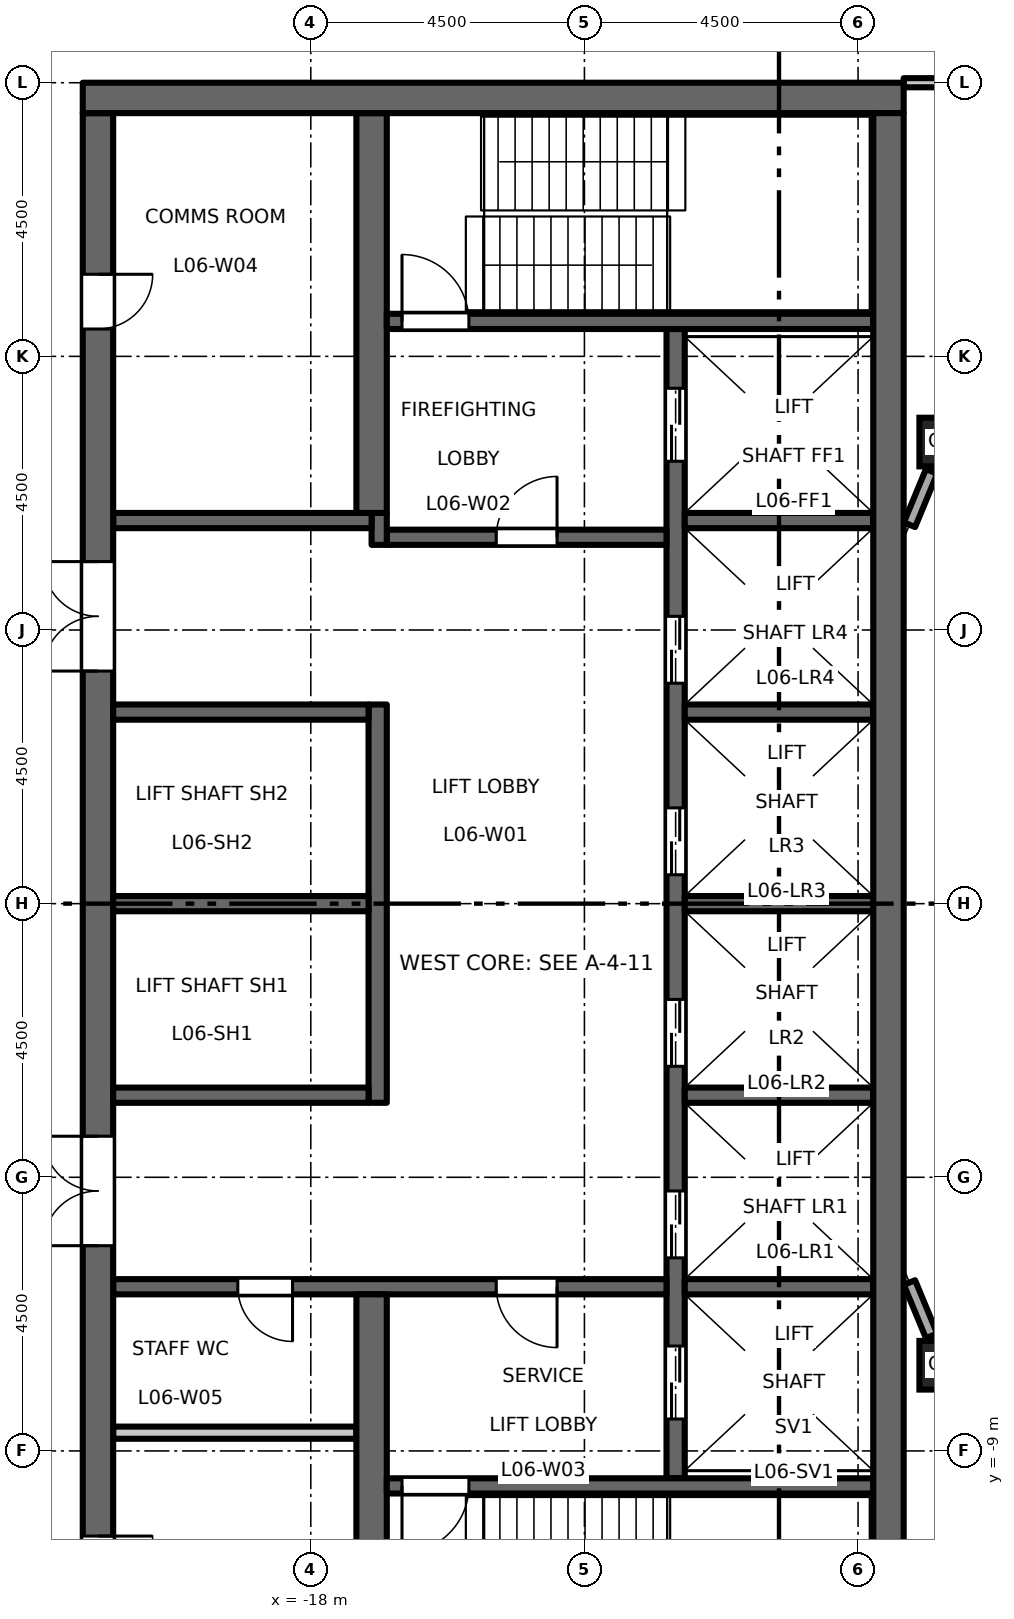
"""IFC4 building model, lengths in metres.
Left out: names, types, materials, properties, quantities, classifications, styles, units other than length and angle.
Written with IfcOpenShell. Run it as: python <this file> out.ifc"""

import sys

from ifc_helpers import new_model, si_unit, direction, frame, frame_2d, origin, origin_2d, place, context, subcontext, project, spatial, rectangle, hollow_rectangle, extrude, element, fill, save


model = new_model("IFC4")
c1 = context("Model", 3, precision=1e-05, world=origin(), true_north=direction((0.0, 1.0)))
c2 = subcontext(c1, "Body", "Model", "MODEL_VIEW")
j1 = project(units=[si_unit("LENGTHUNIT", "METRE"), si_unit("PLANEANGLEUNIT", "RADIAN")], contexts=[c1])
p1 = place(None, origin())
s1 = spatial("IfcSite", under=j1, at=p1, CompositionType="ELEMENT")
p2 = place(p1, origin())
s2 = spatial("IfcBuilding", under=s1, at=p2, CompositionType="ELEMENT")
p3 = place(p2, frame((0.0, 0.0, 31.2)))
s3 = spatial("IfcBuildingStorey", under=s2, at=p3, CompositionType="ELEMENT", Elevation=31.2)
for number, where, z_axis, x_axis in (
    (1, (-7.591, -7.591, 0.0), (0.0, 0.0, 1.0), (1.0, 0.0, 0.0)),
    (2, (-7.591, 7.591, 0.0), (0.0, 0.0, 1.0), (1.0, 0.0, 0.0)),
):
    element("IfcColumn", number, at=place(p3, frame(where, z_axis=z_axis, x_axis=x_axis)), inside=s3, PredefinedType="COLUMN", context=c2, shape_type="SweptSolid", body=[
        extrude(hollow_rectangle(XDim=0.8, YDim=0.8, WallThickness=0.05, at=origin_2d()), origin(), (0.0, 0.0, 1.0), 4.5),
    ])
p4 = place(p3, frame((-12.0, -9.45, 0.0), z_axis=(0.0, 0.0, 1.0), x_axis=(0.0, 1.0, 0.0)))
e3 = element("IfcWall", 3, at=p4, inside=s3, PredefinedType="SHEAR", context=c2, shape_type="SweptSolid", body=[
    extrude(rectangle(XDim=18.9, YDim=0.3, at=frame_2d((9.45, 0.0))), origin(), (0.0, 0.0, 1.0), 4.35),
])
p5 = place(p4, frame((3.625, 0.0, 0.0)))
e4 = element("IfcOpeningElement", 4, at=p5, cuts=e3, PredefinedType="OPENING", context=c2, shape_type="SweptSolid", body=[
    extrude(rectangle(XDim=1.1, YDim=2.1, at=frame_2d((0.55, 1.05))), frame((0.0, 0.16, 0.0), z_axis=(0.0, -1.0, 0.0), x_axis=(1.0, 0.0, 0.0)), (0.0, 0.0, 1.0), 0.32),
])
p6 = place(p4, frame((6.775, 0.0, 0.0)))
e5 = element("IfcOpeningElement", 5, at=p6, cuts=e3, PredefinedType="OPENING", context=c2, shape_type="SweptSolid", body=[
    extrude(rectangle(XDim=1.1, YDim=2.1, at=frame_2d((0.55, 1.05))), frame((0.0, 0.16, 0.0), z_axis=(0.0, -1.0, 0.0), x_axis=(1.0, 0.0, 0.0)), (0.0, 0.0, 1.0), 0.32),
])
p7 = place(p4, frame((9.925, 0.0, 0.0)))
e6 = element("IfcOpeningElement", 6, at=p7, cuts=e3, PredefinedType="OPENING", context=c2, shape_type="SweptSolid", body=[
    extrude(rectangle(XDim=1.1, YDim=2.1, at=frame_2d((0.55, 1.05))), frame((0.0, 0.16, 0.0), z_axis=(0.0, -1.0, 0.0), x_axis=(1.0, 0.0, 0.0)), (0.0, 0.0, 1.0), 0.32),
])
p8 = place(p4, frame((13.075, 0.0, 0.0)))
e7 = element("IfcOpeningElement", 7, at=p8, cuts=e3, PredefinedType="OPENING", context=c2, shape_type="SweptSolid", body=[
    extrude(rectangle(XDim=1.1, YDim=2.1, at=frame_2d((0.55, 1.05))), frame((0.0, 0.16, 0.0), z_axis=(0.0, -1.0, 0.0), x_axis=(1.0, 0.0, 0.0)), (0.0, 0.0, 1.0), 0.32),
])
p9 = place(p4, frame((16.725, 0.0, 0.0)))
e8 = element("IfcOpeningElement", 8, at=p9, cuts=e3, PredefinedType="OPENING", context=c2, shape_type="SweptSolid", body=[
    extrude(rectangle(XDim=1.2, YDim=2.1, at=frame_2d((0.6, 1.05))), frame((0.0, 0.16, 0.0), z_axis=(0.0, -1.0, 0.0), x_axis=(1.0, 0.0, 0.0)), (0.0, 0.0, 1.0), 0.32),
])
p10 = place(p4, frame((0.975, 0.0, 0.0)))
e9 = element("IfcOpeningElement", 9, at=p10, cuts=e3, PredefinedType="OPENING", context=c2, shape_type="SweptSolid", body=[
    extrude(rectangle(XDim=1.2, YDim=2.1, at=frame_2d((0.6, 1.05))), frame((0.0, 0.16, 0.0), z_axis=(0.0, -1.0, 0.0), x_axis=(1.0, 0.0, 0.0)), (0.0, 0.0, 1.0), 0.32),
])
p11 = place(p3, frame((-12.15, 6.025, 0.0), z_axis=(0.0, 0.0, 1.0), x_axis=(-1.0, 0.0, 0.0)))
e10 = element("IfcWall", 10, at=p11, inside=s3, PredefinedType="SHEAR", context=c2, shape_type="SweptSolid", body=[
    extrude(rectangle(XDim=4.6, YDim=0.25, at=frame_2d((2.3, 0.0))), origin(), (0.0, 0.0, 1.0), 4.35),
])
p12 = place(p11, frame((1.8, 0.0, 0.0)))
e11 = element("IfcOpeningElement", 11, at=p12, cuts=e10, PredefinedType="OPENING", context=c2, shape_type="SweptSolid", body=[
    extrude(rectangle(XDim=1.0, YDim=2.1, at=frame_2d((0.5, 1.05))), frame((0.0, 0.135, 0.0), z_axis=(0.0, -1.0, 0.0), x_axis=(1.0, 0.0, 0.0)), (0.0, 0.0, 1.0), 0.27),
])
p13 = place(p3, frame((-16.875, 5.9, 0.0), z_axis=(0.0, 0.0, 1.0), x_axis=(0.0, 1.0, 0.0)))
e12 = element("IfcWall", 12, at=p13, inside=s3, PredefinedType="SHEAR", context=c2, shape_type="SweptSolid", body=[
    extrude(rectangle(XDim=0.525, YDim=0.25, at=frame_2d((0.263, 0.0))), origin(), (0.0, 0.0, 1.0), 4.35),
])
p14 = place(p3, frame((-17.0, 6.3, 0.0), z_axis=(0.0, 0.0, 1.0), x_axis=(-1.0, 0.0, 0.0)))
e13 = element("IfcWall", 13, at=p14, inside=s3, PredefinedType="SHEAR", context=c2, shape_type="SweptSolid", body=[
    extrude(rectangle(XDim=4.25, YDim=0.25, at=frame_2d((2.125, 0.0))), origin(), (0.0, 0.0, 1.0), 4.35),
])
p15 = place(p3, frame((-12.15, -6.3, 0.0), z_axis=(0.0, 0.0, 1.0), x_axis=(-1.0, 0.0, 0.0)))
e14 = element("IfcWall", 14, at=p15, inside=s3, PredefinedType="SHEAR", context=c2, shape_type="SweptSolid", body=[
    extrude(rectangle(XDim=9.1, YDim=0.25, at=frame_2d((4.55, 0.0))), origin(), (0.0, 0.0, 1.0), 4.35),
])
p16 = place(p15, frame((1.8, 0.0, 0.0)))
e15 = element("IfcOpeningElement", 15, at=p16, cuts=e14, PredefinedType="OPENING", context=c2, shape_type="SweptSolid", body=[
    extrude(rectangle(XDim=1.0, YDim=2.1, at=frame_2d((0.5, 1.05))), frame((0.0, 0.135, 0.0), z_axis=(0.0, -1.0, 0.0), x_axis=(1.0, 0.0, 0.0)), (0.0, 0.0, 1.0), 0.27),
])
p17 = place(p15, frame((6.15, 0.0, 0.0)))
e16 = element("IfcOpeningElement", 16, at=p17, cuts=e14, PredefinedType="OPENING", context=c2, shape_type="SweptSolid", body=[
    extrude(rectangle(XDim=0.9, YDim=2.1, at=frame_2d((0.45, 1.05))), frame((0.0, 0.135, 0.0), z_axis=(0.0, -1.0, 0.0), x_axis=(1.0, 0.0, 0.0)), (0.0, 0.0, 1.0), 0.27),
])
p18 = place(p3, frame((-21.5, -13.0, 0.0), z_axis=(0.0, 0.0, 1.0), x_axis=(0.0, 1.0, 0.0)))
e17 = element("IfcWall", 17, at=p18, inside=s3, PredefinedType="SHEAR", context=c2, shape_type="SweptSolid", body=[
    extrude(rectangle(XDim=26.0, YDim=0.5, at=frame_2d((13.0, 0.0))), origin(), (0.0, 0.0, 1.0), 4.35),
])
p19 = place(p18, frame((16.825, 0.0, 0.0)))
e18 = element("IfcOpeningElement", 18, at=p19, cuts=e17, PredefinedType="OPENING", context=c2, shape_type="SweptSolid", body=[
    extrude(rectangle(XDim=1.8, YDim=2.1, at=frame_2d((0.9, 1.05))), frame((0.0, 0.26, 0.0), z_axis=(0.0, -1.0, 0.0), x_axis=(1.0, 0.0, 0.0)), (0.0, 0.0, 1.0), 0.52),
])
p20 = place(p18, frame((7.375, 0.0, 0.0)))
e19 = element("IfcOpeningElement", 19, at=p20, cuts=e17, PredefinedType="OPENING", context=c2, shape_type="SweptSolid", body=[
    extrude(rectangle(XDim=1.8, YDim=2.1, at=frame_2d((0.9, 1.05))), frame((0.0, 0.26, 0.0), z_axis=(0.0, -1.0, 0.0), x_axis=(1.0, 0.0, 0.0)), (0.0, 0.0, 1.0), 0.52),
])
p21 = place(p18, frame((22.45, 0.0, 0.0)))
e20 = element("IfcOpeningElement", 20, at=p21, cuts=e17, PredefinedType="OPENING", context=c2, shape_type="SweptSolid", body=[
    extrude(rectangle(XDim=0.9, YDim=2.1, at=frame_2d((0.45, 1.05))), frame((0.0, 0.26, 0.0), z_axis=(0.0, -1.0, 0.0), x_axis=(1.0, 0.0, 0.0)), (0.0, 0.0, 1.0), 0.52),
])
p22 = place(p18, frame((1.7, 0.0, 0.0)))
e21 = element("IfcOpeningElement", 21, at=p22, cuts=e17, PredefinedType="OPENING", context=c2, shape_type="SweptSolid", body=[
    extrude(rectangle(XDim=0.9, YDim=2.1, at=frame_2d((0.45, 1.05))), frame((0.0, 0.26, 0.0), z_axis=(0.0, -1.0, 0.0), x_axis=(1.0, 0.0, 0.0)), (0.0, 0.0, 1.0), 0.52),
])
p23 = place(p3, frame((-17.25, -8.7, 0.0), z_axis=(0.0, 0.0, 1.0), x_axis=(-1.0, 0.0, 0.0)))
e22 = element("IfcWall", 22, at=p23, inside=s3, PredefinedType="PARTITIONING", context=c2, shape_type="SweptSolid", body=[
    extrude(rectangle(XDim=4.0, YDim=0.2, at=frame_2d((2.0, 0.0))), origin(), (0.0, 0.0, 1.0), 4.35),
])
p24 = place(p3, frame((-16.9, -3.275, 0.0), z_axis=(0.0, 0.0, 1.0), x_axis=(0.0, 1.0, 0.0)))
e23 = element("IfcWall", 23, at=p24, inside=s3, PredefinedType="SHEAR", context=c2, shape_type="SweptSolid", body=[
    extrude(rectangle(XDim=6.55, YDim=0.3, at=frame_2d((3.275, 0.0))), origin(), (0.0, 0.0, 1.0), 4.35),
])
for number, where, z_axis, x_axis in (
    (24, (-17.05, 0.0, 0.0), (0.0, 0.0, 1.0), (-1.0, 0.0, 0.0)),
    (25, (-17.05, 3.15, 0.0), (0.0, 0.0, 1.0), (-1.0, 0.0, 0.0)),
    (26, (-17.05, -3.15, 0.0), (0.0, 0.0, 1.0), (-1.0, 0.0, 0.0)),
):
    element("IfcWall", number, at=place(p3, frame(where, z_axis=z_axis, x_axis=x_axis)), inside=s3, PredefinedType="SHEAR", context=c2, shape_type="SweptSolid", body=[
        extrude(rectangle(XDim=4.2, YDim=0.25, at=frame_2d((2.1, 0.0))), origin(), (0.0, 0.0, 1.0), 4.35),
    ])
for number, where, z_axis, x_axis in (
    (27, (-17.0, 6.425, 0.0), (0.0, 0.0, 1.0), (0.0, 1.0, 0.0)),
    (28, (-17.0, -13.0, 0.0), (0.0, 0.0, 1.0), (0.0, 1.0, 0.0)),
):
    element("IfcWall", number, at=place(p3, frame(where, z_axis=z_axis, x_axis=x_axis)), inside=s3, PredefinedType="SHEAR", context=c2, shape_type="SweptSolid", body=[
        extrude(rectangle(XDim=6.575, YDim=0.5, at=frame_2d((3.288, 0.0))), origin(), (0.0, 0.0, 1.0), 4.35),
    ])
for number, where, z_axis, x_axis in (
    (29, (-8.75, 0.0, 0.0), (0.0, 0.0, 1.0), (-1.0, 0.0, 0.0)),
    (30, (-8.75, 3.15, 0.0), (0.0, 0.0, 1.0), (-1.0, 0.0, 0.0)),
    (31, (-8.75, 6.3, 0.0), (0.0, 0.0, 1.0), (-1.0, 0.0, 0.0)),
    (32, (-8.75, -3.15, 0.0), (0.0, 0.0, 1.0), (-1.0, 0.0, 0.0)),
    (33, (-8.75, -6.3, 0.0), (0.0, 0.0, 1.0), (-1.0, 0.0, 0.0)),
):
    element("IfcWall", number, at=place(p3, frame(where, z_axis=z_axis, x_axis=x_axis)), inside=s3, PredefinedType="SHEAR", context=c2, shape_type="SweptSolid", body=[
        extrude(rectangle(XDim=3.1, YDim=0.25, at=frame_2d((1.55, 0.0))), origin(), (0.0, 0.0, 1.0), 4.35),
    ])
p25 = place(p3, frame((-8.75, 9.575, 0.0), z_axis=(0.0, 0.0, 1.0), x_axis=(-1.0, 0.0, 0.0)))
e34 = element("IfcWall", 34, at=p25, inside=s3, PredefinedType="SHEAR", context=c2, shape_type="SweptSolid", body=[
    extrude(rectangle(XDim=8.0, YDim=0.25, at=frame_2d((4.0, 0.0))), origin(), (0.0, 0.0, 1.0), 4.35),
])
p26 = place(p25, frame((6.65, 0.0, 0.0)))
e35 = element("IfcOpeningElement", 35, at=p26, cuts=e34, PredefinedType="OPENING", context=c2, shape_type="SweptSolid", body=[
    extrude(rectangle(XDim=1.1, YDim=2.1, at=frame_2d((0.55, 1.05))), frame((0.0, 0.135, 0.0), z_axis=(0.0, -1.0, 0.0), x_axis=(1.0, 0.0, 0.0)), (0.0, 0.0, 1.0), 0.27),
])
p27 = place(p3, frame((-8.75, -9.575, 0.0), z_axis=(0.0, 0.0, 1.0), x_axis=(-1.0, 0.0, 0.0)))
e36 = element("IfcWall", 36, at=p27, inside=s3, PredefinedType="SHEAR", context=c2, shape_type="SweptSolid", body=[
    extrude(rectangle(XDim=8.0, YDim=0.25, at=frame_2d((4.0, 0.0))), origin(), (0.0, 0.0, 1.0), 4.35),
])
p28 = place(p27, frame((6.65, 0.0, 0.0)))
e37 = element("IfcOpeningElement", 37, at=p28, cuts=e36, PredefinedType="OPENING", context=c2, shape_type="SweptSolid", body=[
    extrude(rectangle(XDim=1.1, YDim=2.1, at=frame_2d((0.55, 1.05))), frame((0.0, 0.135, 0.0), z_axis=(0.0, -1.0, 0.0), x_axis=(1.0, 0.0, 0.0)), (0.0, 0.0, 1.0), 0.27),
])
p29 = place(p3, frame((-8.25, 13.25, 0.0), z_axis=(0.0, 0.0, 1.0), x_axis=(-1.0, 0.0, 0.0)))
e38 = element("IfcWall", 38, at=p29, inside=s3, PredefinedType="SHEAR", context=c2, shape_type="SweptSolid", body=[
    extrude(rectangle(XDim=13.5, YDim=0.5, at=frame_2d((6.75, 0.0))), origin(), (0.0, 0.0, 1.0), 4.35),
])
p30 = place(p3, frame((-8.5, -13.0, 0.0), z_axis=(0.0, 0.0, 1.0), x_axis=(0.0, 1.0, 0.0)))
e39 = element("IfcWall", 39, at=p30, inside=s3, PredefinedType="SHEAR", context=c2, shape_type="SweptSolid", body=[
    extrude(rectangle(XDim=26.0, YDim=0.5, at=frame_2d((13.0, 0.0))), origin(), (0.0, 0.0, 1.0), 4.35),
])
for number, where, z_axis, x_axis in (
    (40, (-7.791, 7.108, 0.0), (0.0, 0.0, 1.0), (-0.383, -0.924, 0.0)),
    (41, (-8.154, -6.231, 0.0), (0.0, 0.0, 1.0), (0.383, -0.924, 0.0)),
):
    element("IfcWall", number, at=place(p3, frame(where, z_axis=z_axis, x_axis=x_axis)), inside=s3, PredefinedType="STANDARD", context=c2, shape_type="SweptSolid", body=[
        extrude(rectangle(XDim=0.949, YDim=0.2, at=frame_2d((0.475, 0.0))), origin(), (0.0, 0.0, 1.0), 3.73),
    ])
p31 = place(p3, frame((-8.25, 13.5, 0.0), z_axis=(0.0, 0.0, 1.0), x_axis=(1.0, 0.0, 0.0)))
e42 = element("IfcWall", 42, at=p31, inside=s3, PredefinedType="PARTITIONING", context=c2, shape_type="SweptSolid", body=[
    extrude(rectangle(XDim=16.5, YDim=0.15, at=frame_2d((8.25, 0.0))), origin(), (0.0, 0.0, 1.0), 3.85),
])
p32 = place(p31, frame((1.4, 0.0, 0.0)))
e43 = element("IfcOpeningElement", 43, at=p32, cuts=e42, PredefinedType="OPENING", context=c2, shape_type="SweptSolid", body=[
    extrude(rectangle(XDim=1.0, YDim=2.1, at=frame_2d((0.5, 1.05))), frame((0.0, 0.085, 0.0), z_axis=(0.0, -1.0, 0.0), x_axis=(1.0, 0.0, 0.0)), (0.0, 0.0, 1.0), 0.17),
])
p33 = place(p31, frame((9.65, 0.0, 0.0)))
e44 = element("IfcOpeningElement", 44, at=p33, cuts=e42, PredefinedType="OPENING", context=c2, shape_type="SweptSolid", body=[
    extrude(rectangle(XDim=1.0, YDim=2.1, at=frame_2d((0.5, 1.05))), frame((0.0, 0.085, 0.0), z_axis=(0.0, -1.0, 0.0), x_axis=(1.0, 0.0, 0.0)), (0.0, 0.0, 1.0), 0.17),
])
p34 = place(p12, origin())
e45 = element("IfcDoor", 45, at=p34, inside=s3, OperationType="SINGLE_SWING_LEFT", PredefinedType="DOOR", context=c2, shape_type="SweptSolid", body=[
    extrude(rectangle(XDim=1.0, YDim=2.1, at=frame_2d((0.5, 1.05))), frame((0.0, 0.025, 0.0), z_axis=(0.0, -1.0, 0.0), x_axis=(1.0, 0.0, 0.0)), (0.0, 0.0, 1.0), 0.05),
])
fill(e11, e45)
p35 = place(p16, origin())
e46 = element("IfcDoor", 46, at=p35, inside=s3, OperationType="SINGLE_SWING_RIGHT", PredefinedType="DOOR", context=c2, shape_type="SweptSolid", body=[
    extrude(rectangle(XDim=1.0, YDim=2.1, at=frame_2d((0.5, 1.05))), frame((0.0, 0.025, 0.0), z_axis=(0.0, -1.0, 0.0), x_axis=(1.0, 0.0, 0.0)), (0.0, 0.0, 1.0), 0.05),
])
fill(e15, e46)
p36 = place(p26, origin())
e47 = element("IfcDoor", 47, at=p36, inside=s3, OperationType="SINGLE_SWING_RIGHT", PredefinedType="DOOR", context=c2, shape_type="SweptSolid", body=[
    extrude(rectangle(XDim=1.1, YDim=2.1, at=frame_2d((0.55, 1.05))), frame((0.0, 0.025, 0.0), z_axis=(0.0, -1.0, 0.0), x_axis=(1.0, 0.0, 0.0)), (0.0, 0.0, 1.0), 0.05),
])
fill(e35, e47)
p37 = place(p28, origin())
e48 = element("IfcDoor", 48, at=p37, inside=s3, OperationType="SINGLE_SWING_LEFT", PredefinedType="DOOR", context=c2, shape_type="SweptSolid", body=[
    extrude(rectangle(XDim=1.1, YDim=2.1, at=frame_2d((0.55, 1.05))), frame((0.0, 0.025, 0.0), z_axis=(0.0, -1.0, 0.0), x_axis=(1.0, 0.0, 0.0)), (0.0, 0.0, 1.0), 0.05),
])
fill(e37, e48)
p38 = place(p19, origin())
e49 = element("IfcDoor", 49, at=p38, inside=s3, OperationType="DOUBLE_DOOR_DOUBLE_SWING", PredefinedType="DOOR", context=c2, shape_type="SweptSolid", body=[
    extrude(rectangle(XDim=1.8, YDim=2.1, at=frame_2d((0.9, 1.05))), frame((0.0, 0.025, 0.0), z_axis=(0.0, -1.0, 0.0), x_axis=(1.0, 0.0, 0.0)), (0.0, 0.0, 1.0), 0.05),
])
fill(e18, e49)
p39 = place(p20, origin())
e50 = element("IfcDoor", 50, at=p39, inside=s3, OperationType="DOUBLE_DOOR_DOUBLE_SWING", PredefinedType="DOOR", context=c2, shape_type="SweptSolid", body=[
    extrude(rectangle(XDim=1.8, YDim=2.1, at=frame_2d((0.9, 1.05))), frame((0.0, 0.025, 0.0), z_axis=(0.0, -1.0, 0.0), x_axis=(1.0, 0.0, 0.0)), (0.0, 0.0, 1.0), 0.05),
])
fill(e19, e50)
p40 = place(p5, origin())
e51 = element("IfcDoor", 51, at=p40, inside=s3, OperationType="DOUBLE_DOOR_SLIDING", PredefinedType="DOOR", context=c2, shape_type="SweptSolid", body=[
    extrude(rectangle(XDim=1.1, YDim=2.1, at=frame_2d((0.55, 1.05))), frame((0.0, 0.025, 0.0), z_axis=(0.0, -1.0, 0.0), x_axis=(1.0, 0.0, 0.0)), (0.0, 0.0, 1.0), 0.05),
])
fill(e4, e51)
p41 = place(p6, origin())
e52 = element("IfcDoor", 52, at=p41, inside=s3, OperationType="DOUBLE_DOOR_SLIDING", PredefinedType="DOOR", context=c2, shape_type="SweptSolid", body=[
    extrude(rectangle(XDim=1.1, YDim=2.1, at=frame_2d((0.55, 1.05))), frame((0.0, 0.025, 0.0), z_axis=(0.0, -1.0, 0.0), x_axis=(1.0, 0.0, 0.0)), (0.0, 0.0, 1.0), 0.05),
])
fill(e5, e52)
p42 = place(p7, origin())
e53 = element("IfcDoor", 53, at=p42, inside=s3, OperationType="DOUBLE_DOOR_SLIDING", PredefinedType="DOOR", context=c2, shape_type="SweptSolid", body=[
    extrude(rectangle(XDim=1.1, YDim=2.1, at=frame_2d((0.55, 1.05))), frame((0.0, 0.025, 0.0), z_axis=(0.0, -1.0, 0.0), x_axis=(1.0, 0.0, 0.0)), (0.0, 0.0, 1.0), 0.05),
])
fill(e6, e53)
p43 = place(p8, origin())
e54 = element("IfcDoor", 54, at=p43, inside=s3, OperationType="DOUBLE_DOOR_SLIDING", PredefinedType="DOOR", context=c2, shape_type="SweptSolid", body=[
    extrude(rectangle(XDim=1.1, YDim=2.1, at=frame_2d((0.55, 1.05))), frame((0.0, 0.025, 0.0), z_axis=(0.0, -1.0, 0.0), x_axis=(1.0, 0.0, 0.0)), (0.0, 0.0, 1.0), 0.05),
])
fill(e7, e54)
p44 = place(p9, origin())
e55 = element("IfcDoor", 55, at=p44, inside=s3, OperationType="DOUBLE_DOOR_SLIDING", PredefinedType="DOOR", context=c2, shape_type="SweptSolid", body=[
    extrude(rectangle(XDim=1.2, YDim=2.1, at=frame_2d((0.6, 1.05))), frame((0.0, 0.025, 0.0), z_axis=(0.0, -1.0, 0.0), x_axis=(1.0, 0.0, 0.0)), (0.0, 0.0, 1.0), 0.05),
])
fill(e8, e55)
p45 = place(p10, origin())
e56 = element("IfcDoor", 56, at=p45, inside=s3, OperationType="DOUBLE_DOOR_SLIDING", PredefinedType="DOOR", context=c2, shape_type="SweptSolid", body=[
    extrude(rectangle(XDim=1.2, YDim=2.1, at=frame_2d((0.6, 1.05))), frame((0.0, 0.025, 0.0), z_axis=(0.0, -1.0, 0.0), x_axis=(1.0, 0.0, 0.0)), (0.0, 0.0, 1.0), 0.05),
])
fill(e9, e56)
p46 = place(p21, origin())
e57 = element("IfcDoor", 57, at=p46, inside=s3, OperationType="SINGLE_SWING_RIGHT", PredefinedType="DOOR", context=c2, shape_type="SweptSolid", body=[
    extrude(rectangle(XDim=0.9, YDim=2.1, at=frame_2d((0.45, 1.05))), frame((0.0, 0.025, 0.0), z_axis=(0.0, -1.0, 0.0), x_axis=(1.0, 0.0, 0.0)), (0.0, 0.0, 1.0), 0.05),
])
fill(e20, e57)
p47 = place(p17, origin())
e58 = element("IfcDoor", 58, at=p47, inside=s3, OperationType="SINGLE_SWING_RIGHT", PredefinedType="DOOR", context=c2, shape_type="SweptSolid", body=[
    extrude(rectangle(XDim=0.9, YDim=2.1, at=frame_2d((0.45, 1.05))), frame((0.0, 0.025, 0.0), z_axis=(0.0, -1.0, 0.0), x_axis=(1.0, 0.0, 0.0)), (0.0, 0.0, 1.0), 0.05),
])
fill(e16, e58)
p48 = place(p22, origin())
e59 = element("IfcDoor", 59, at=p48, inside=s3, OperationType="SINGLE_SWING_RIGHT", PredefinedType="DOOR", context=c2, shape_type="SweptSolid", body=[
    extrude(rectangle(XDim=0.9, YDim=2.1, at=frame_2d((0.45, 1.05))), frame((0.0, 0.025, 0.0), z_axis=(0.0, -1.0, 0.0), x_axis=(1.0, 0.0, 0.0)), (0.0, 0.0, 1.0), 0.05),
])
fill(e21, e59)
save(model, sys.argv[1])
